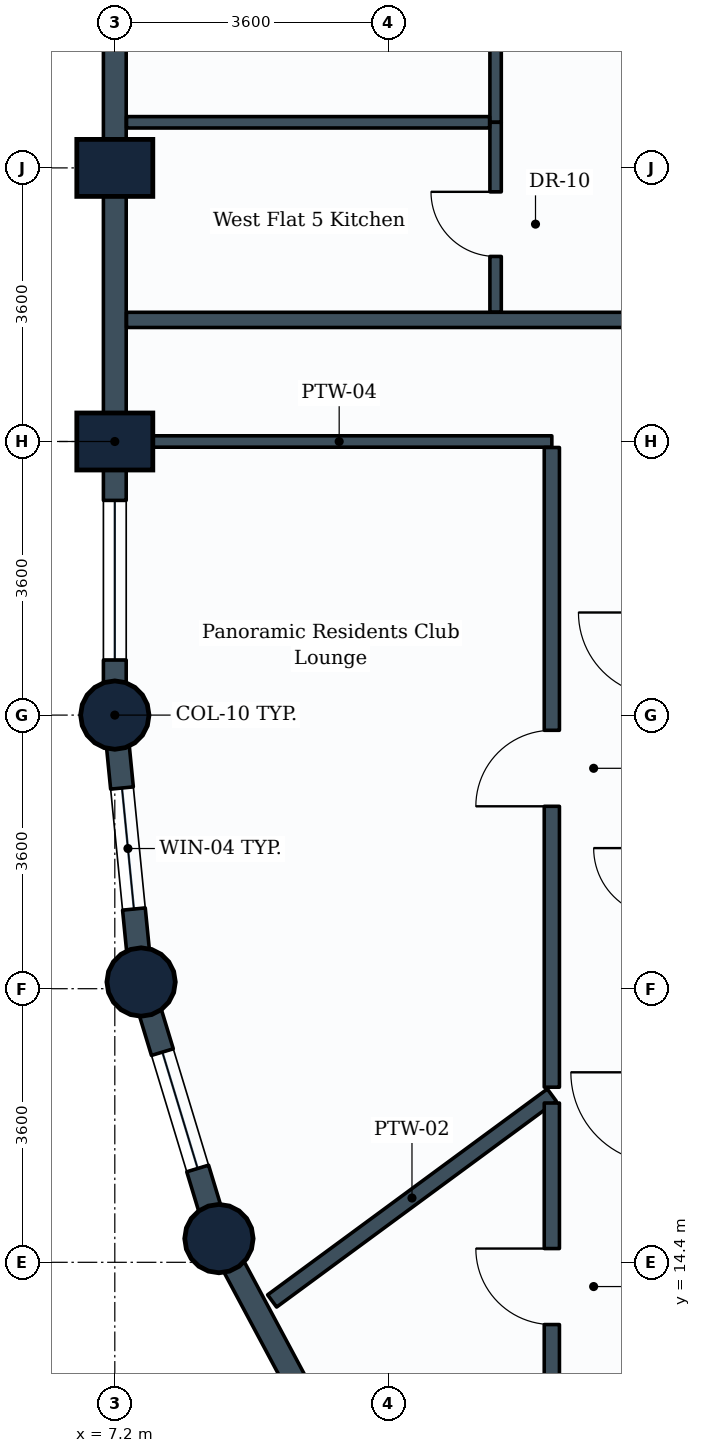
"""IFC4 building model, lengths in metres.
Left out: names, types, materials, properties, quantities, classifications, styles, units other than length and angle.
Written with IfcOpenShell. Run it as: python <this file> out.ifc"""

import sys

from ifc_helpers import new_model, si_unit, direction, frame, frame_2d, origin, origin_2d, place, context, subcontext, project, spatial, rectangle, circle, extrude, element, fill, save


model = new_model("IFC4")
c1 = context("Model", 3, precision=1e-05, world=origin(), true_north=direction((0.0, 1.0)))
c2 = subcontext(c1, "Body", "Model", "MODEL_VIEW")
j1 = project(units=[si_unit("LENGTHUNIT", "METRE"), si_unit("PLANEANGLEUNIT", "RADIAN")], contexts=[c1])
p1 = place(None, origin())
s1 = spatial("IfcSite", under=j1, at=p1, CompositionType="ELEMENT")
p2 = place(p1, origin())
s2 = spatial("IfcBuilding", under=s1, at=p2, CompositionType="ELEMENT")
p3 = place(p2, frame((0.0, 0.0, 139.0)))
s3 = spatial("IfcBuildingStorey", under=s2, at=p3, CompositionType="ELEMENT", Elevation=139.0)
p4 = place(p3, frame((7.2, 21.6, 0.0), z_axis=(0.0, 0.0, 1.0), x_axis=(1.0, 0.0, 0.0)))
e1 = element("IfcColumn", 1, at=p4, inside=s3, PredefinedType="COLUMN", context=c2, shape_type="SweptSolid", body=[
    extrude(circle(Radius=0.45, at=origin_2d()), origin(), (0.0, 0.0, 1.0), 3.8),
])
for number, where, z_axis, x_axis in (
    (2, (7.2, 25.2, 0.0), (0.0, 0.0, 1.0), (0.0, 1.0, 0.0)),
    (3, (7.2, 28.8, 0.0), (0.0, 0.0, 1.0), (0.0, 1.0, 0.0)),
):
    element("IfcColumn", number, at=place(p3, frame(where, z_axis=z_axis, x_axis=x_axis)), inside=s3, PredefinedType="COLUMN", context=c2, shape_type="SweptSolid", body=[
        extrude(rectangle(XDim=0.75, YDim=1.0, at=origin_2d()), origin(), (0.0, 0.0, 1.0), 3.8),
    ])
for number, where, z_axis, x_axis in (
    (4, (7.546, 18.088, 0.0), (0.0, 0.0, 1.0), (1.0, 0.0, 0.0)),
    (5, (8.57, 14.712, 0.0), (0.0, 0.0, 1.0), (1.0, 0.0, 0.0)),
):
    element("IfcColumn", number, at=place(p3, frame(where, z_axis=z_axis, x_axis=x_axis)), inside=s3, PredefinedType="COLUMN", context=c2, shape_type="SweptSolid", body=[
        extrude(circle(Radius=0.45, at=origin_2d()), origin(), (0.0, 0.0, 1.0), 3.8),
    ])
p5 = place(p3, frame((7.2, 28.8, 0.0), z_axis=(0.0, 0.0, 1.0), x_axis=(0.0, 1.0, 0.0)))
e6 = element("IfcWall", 6, at=p5, inside=s3, PredefinedType="STANDARD", context=c2, shape_type="SweptSolid", body=[
    extrude(rectangle(XDim=3.6, YDim=0.3, at=frame_2d((1.8, 0.0))), origin(), (0.0, 0.0, 1.0), 2.93),
])
p6 = place(p3, frame((7.2, 25.2, 0.0), z_axis=(0.0, 0.0, 1.0), x_axis=(0.0, 1.0, 0.0)))
e7 = element("IfcWall", 7, at=p6, inside=s3, PredefinedType="STANDARD", context=c2, shape_type="SweptSolid", body=[
    extrude(rectangle(XDim=3.6, YDim=0.3, at=frame_2d((1.8, 0.0))), origin(), (0.0, 0.0, 1.0), 2.93),
])
p7 = place(p3, frame((7.2, 21.6, 0.0), z_axis=(0.0, 0.0, 1.0), x_axis=(0.0, 1.0, 0.0)))
e8 = element("IfcWall", 8, at=p7, inside=s3, PredefinedType="STANDARD", context=c2, shape_type="SweptSolid", body=[
    extrude(rectangle(XDim=3.6, YDim=0.3, at=frame_2d((1.8, 0.0))), origin(), (0.0, 0.0, 1.0), 2.93),
])
p8 = place(p7, frame((0.725, 0.0, 0.85)))
e9 = element("IfcOpeningElement", 9, at=p8, cuts=e8, PredefinedType="OPENING", context=c2, shape_type="SweptSolid", body=[
    extrude(rectangle(XDim=2.1, YDim=1.35, at=frame_2d((1.05, 0.675))), frame((0.0, 0.16, 0.0), z_axis=(0.0, -1.0, 0.0), x_axis=(1.0, 0.0, 0.0)), (0.0, 0.0, 1.0), 0.32),
])
p9 = place(p3, frame((7.546, 18.088, 0.0), z_axis=(0.0, 0.0, 1.0), x_axis=(-0.09802417461, 0.995184033831, 0.0)))
e10 = element("IfcWall", 10, at=p9, inside=s3, PredefinedType="STANDARD", context=c2, shape_type="SweptSolid", body=[
    extrude(rectangle(XDim=3.529, YDim=0.3, at=frame_2d((1.765, 0.0))), origin(), (0.0, 0.0, 1.0), 2.93),
])
p10 = place(p9, frame((0.965, 0.0, 0.85)))
e11 = element("IfcOpeningElement", 11, at=p10, cuts=e10, PredefinedType="OPENING", context=c2, shape_type="SweptSolid", body=[
    extrude(rectangle(XDim=1.6, YDim=1.35, at=frame_2d((0.8, 0.675))), frame((0.0, 0.16, 0.0), z_axis=(0.0, -1.0, 0.0), x_axis=(1.0, 0.0, 0.0)), (0.0, 0.0, 1.0), 0.32),
])
p11 = place(p3, frame((8.57, 14.712, 0.0), z_axis=(0.0, 0.0, 1.0), x_axis=(-0.290305086481, 0.956934144423, 0.0)))
e12 = element("IfcWall", 12, at=p11, inside=s3, PredefinedType="STANDARD", context=c2, shape_type="SweptSolid", body=[
    extrude(rectangle(XDim=3.528, YDim=0.3, at=frame_2d((1.764, 0.0))), origin(), (0.0, 0.0, 1.0), 2.93),
])
p12 = place(p11, frame((0.964, 0.0, 0.85)))
e13 = element("IfcOpeningElement", 13, at=p12, cuts=e12, PredefinedType="OPENING", context=c2, shape_type="SweptSolid", body=[
    extrude(rectangle(XDim=1.6, YDim=1.35, at=frame_2d((0.8, 0.675))), frame((0.0, 0.16, 0.0), z_axis=(0.0, -1.0, 0.0), x_axis=(1.0, 0.0, 0.0)), (0.0, 0.0, 1.0), 0.32),
])
p13 = place(p3, frame((10.234, 11.6, 0.0), z_axis=(0.0, 0.0, 1.0), x_axis=(-0.47151087309, 0.881860247748, 0.0)))
e14 = element("IfcWall", 14, at=p13, inside=s3, PredefinedType="STANDARD", context=c2, shape_type="SweptSolid", body=[
    extrude(rectangle(XDim=3.529, YDim=0.3, at=frame_2d((1.764, 0.0))), origin(), (0.0, 0.0, 1.0), 2.93),
])
p14 = place(p3, frame((7.354, 25.2, 0.0), z_axis=(0.0, 0.0, 1.0), x_axis=(1.0, 0.0, 0.0)))
e15 = element("IfcWall", 15, at=p14, inside=s3, PredefinedType="PARTITIONING", context=c2, shape_type="SweptSolid", body=[
    extrude(rectangle(XDim=5.596, YDim=0.15, at=frame_2d((2.798, 0.0))), origin(), (0.0, 0.0, 1.0), 3.535),
])
p15 = place(p3, frame((12.95, 16.6, 0.0), z_axis=(0.0, 0.0, 1.0), x_axis=(-0.805365932827, -0.592777963694, 0.0)))
e16 = element("IfcWall", 16, at=p15, inside=s3, PredefinedType="PARTITIONING", context=c2, shape_type="SweptSolid", body=[
    extrude(rectangle(XDim=4.57, YDim=0.2, at=frame_2d((2.285, 0.0))), origin(), (0.0, 0.0, 1.0), 2.93),
])
p16 = place(p3, frame((12.95, 16.704, 0.0), z_axis=(0.0, 0.0, 1.0), x_axis=(0.0, 1.0, 0.0)))
e17 = element("IfcWall", 17, at=p16, inside=s3, PredefinedType="PARTITIONING", context=c2, shape_type="SweptSolid", body=[
    extrude(rectangle(XDim=8.417, YDim=0.2, at=frame_2d((4.208, 0.0))), origin(), (0.0, 0.0, 1.0), 3.18),
])
p17 = place(p16, frame((3.696, 0.0, 0.0)))
e18 = element("IfcOpeningElement", 18, at=p17, cuts=e17, PredefinedType="OPENING", context=c2, shape_type="SweptSolid", body=[
    extrude(rectangle(XDim=1.0, YDim=2.1, at=frame_2d((0.5, 1.05))), frame((0.0, 0.11, 0.0), z_axis=(0.0, -1.0, 0.0), x_axis=(1.0, 0.0, 0.0)), (0.0, 0.0, 1.0), 0.22),
])
p18 = place(p3, frame((12.95, 9.619, 0.0), z_axis=(0.0, 0.0, 1.0), x_axis=(0.0, 1.0, 0.0)))
e19 = element("IfcWall", 19, at=p18, inside=s3, PredefinedType="PARTITIONING", context=c2, shape_type="SweptSolid", body=[
    extrude(rectangle(XDim=6.877, YDim=0.2, at=frame_2d((3.438, 0.0))), origin(), (0.0, 0.0, 1.0), 3.17),
])
p19 = place(p18, frame((3.962, 0.0, 0.0)))
e20 = element("IfcOpeningElement", 20, at=p19, cuts=e19, PredefinedType="OPENING", context=c2, shape_type="SweptSolid", body=[
    extrude(rectangle(XDim=1.0, YDim=2.1, at=frame_2d((0.5, 1.05))), frame((0.0, 0.11, 0.0), z_axis=(0.0, -1.0, 0.0), x_axis=(1.0, 0.0, 0.0)), (0.0, 0.0, 1.0), 0.22),
])
p20 = place(p3, frame((7.354, 26.8, 0.0), z_axis=(0.0, 0.0, 1.0), x_axis=(1.0, 0.0, 0.0)))
e21 = element("IfcWall", 21, at=p20, inside=s3, PredefinedType="PARTITIONING", context=c2, shape_type="SweptSolid", body=[
    extrude(rectangle(XDim=14.046, YDim=0.2, at=frame_2d((7.023, 0.0))), origin(), (0.0, 0.0, 1.0), 2.93),
])
p21 = place(p3, frame((12.21, 29.4, 0.0), z_axis=(0.0, 0.0, 1.0), x_axis=(0.0, 1.0, 0.0)))
e22 = element("IfcWall", 22, at=p21, inside=s3, PredefinedType="PARTITIONING", context=c2, shape_type="SweptSolid", body=[
    extrude(rectangle(XDim=5.166, YDim=0.15, at=frame_2d((2.583, 0.0))), origin(), (0.0, 0.0, 1.0), 3.18),
])
p22 = place(p21, frame((2.185, 0.0, 0.0)))
e23 = element("IfcOpeningElement", 23, at=p22, cuts=e22, PredefinedType="OPENING", context=c2, shape_type="SweptSolid", body=[
    extrude(rectangle(XDim=0.9, YDim=2.1, at=frame_2d((0.45, 1.05))), frame((0.0, 0.085, 0.0), z_axis=(0.0, -1.0, 0.0), x_axis=(1.0, 0.0, 0.0)), (0.0, 0.0, 1.0), 0.17),
])
p23 = place(p3, frame((12.21, 26.904, 0.0), z_axis=(0.0, 0.0, 1.0), x_axis=(0.0, 1.0, 0.0)))
e24 = element("IfcWall", 24, at=p23, inside=s3, PredefinedType="PARTITIONING", context=c2, shape_type="SweptSolid", body=[
    extrude(rectangle(XDim=2.496, YDim=0.15, at=frame_2d((1.248, 0.0))), origin(), (0.0, 0.0, 1.0), 3.17),
])
p24 = place(p23, frame((0.731, 0.0, 0.0)))
e25 = element("IfcOpeningElement", 25, at=p24, cuts=e24, PredefinedType="OPENING", context=c2, shape_type="SweptSolid", body=[
    extrude(rectangle(XDim=0.85, YDim=2.1, at=frame_2d((0.425, 1.05))), frame((0.0, 0.085, 0.0), z_axis=(0.0, -1.0, 0.0), x_axis=(1.0, 0.0, 0.0)), (0.0, 0.0, 1.0), 0.17),
])
p25 = place(p3, frame((7.354, 29.4, 0.0), z_axis=(0.0, 0.0, 1.0), x_axis=(1.0, 0.0, 0.0)))
e26 = element("IfcWall", 26, at=p25, inside=s3, PredefinedType="PARTITIONING", context=c2, shape_type="SweptSolid", body=[
    extrude(rectangle(XDim=4.777, YDim=0.15, at=frame_2d((2.389, 0.0))), origin(), (0.0, 0.0, 1.0), 2.93),
])
p26 = place(p8, origin())
e27 = element("IfcWindow", 27, at=p26, inside=s3, PartitioningType="SINGLE_PANEL", PredefinedType="WINDOW", context=c2, shape_type="SweptSolid", body=[
    extrude(rectangle(XDim=2.1, YDim=1.35, at=frame_2d((1.05, 0.675))), frame((0.0, 0.03, 0.0), z_axis=(0.0, -1.0, 0.0), x_axis=(1.0, 0.0, 0.0)), (0.0, 0.0, 1.0), 0.06),
])
fill(e9, e27)
p27 = place(p10, origin())
e28 = element("IfcWindow", 28, at=p27, inside=s3, PartitioningType="SINGLE_PANEL", PredefinedType="WINDOW", context=c2, shape_type="SweptSolid", body=[
    extrude(rectangle(XDim=1.6, YDim=1.35, at=frame_2d((0.8, 0.675))), frame((0.0, 0.03, 0.0), z_axis=(0.0, -1.0, 0.0), x_axis=(1.0, 0.0, 0.0)), (0.0, 0.0, 1.0), 0.06),
])
fill(e11, e28)
p28 = place(p12, origin())
e29 = element("IfcWindow", 29, at=p28, inside=s3, PartitioningType="SINGLE_PANEL", PredefinedType="WINDOW", context=c2, shape_type="SweptSolid", body=[
    extrude(rectangle(XDim=1.6, YDim=1.35, at=frame_2d((0.8, 0.675))), frame((0.0, 0.03, 0.0), z_axis=(0.0, -1.0, 0.0), x_axis=(1.0, 0.0, 0.0)), (0.0, 0.0, 1.0), 0.06),
])
fill(e13, e29)
p29 = place(p17, origin())
e30 = element("IfcDoor", 30, at=p29, inside=s3, OperationType="SINGLE_SWING_LEFT", PredefinedType="DOOR", context=c2, shape_type="SweptSolid", body=[
    extrude(rectangle(XDim=1.0, YDim=2.1, at=frame_2d((0.5, 1.05))), frame((0.0, 0.025, 0.0), z_axis=(0.0, -1.0, 0.0), x_axis=(1.0, 0.0, 0.0)), (0.0, 0.0, 1.0), 0.05),
])
fill(e18, e30)
p30 = place(p19, origin())
e31 = element("IfcDoor", 31, at=p30, inside=s3, OperationType="SINGLE_SWING_RIGHT", PredefinedType="DOOR", context=c2, shape_type="SweptSolid", body=[
    extrude(rectangle(XDim=1.0, YDim=2.1, at=frame_2d((0.5, 1.05))), frame((0.0, 0.025, 0.0), z_axis=(0.0, -1.0, 0.0), x_axis=(1.0, 0.0, 0.0)), (0.0, 0.0, 1.0), 0.05),
])
fill(e20, e31)
p31 = place(p24, origin())
e32 = element("IfcDoor", 32, at=p31, inside=s3, OperationType="SINGLE_SWING_RIGHT", PredefinedType="DOOR", context=c2, shape_type="SweptSolid", body=[
    extrude(rectangle(XDim=0.85, YDim=2.1, at=frame_2d((0.425, 1.05))), frame((0.0, 0.025, 0.0), z_axis=(0.0, -1.0, 0.0), x_axis=(1.0, 0.0, 0.0)), (0.0, 0.0, 1.0), 0.05),
])
fill(e25, e32)
save(model, sys.argv[1])
